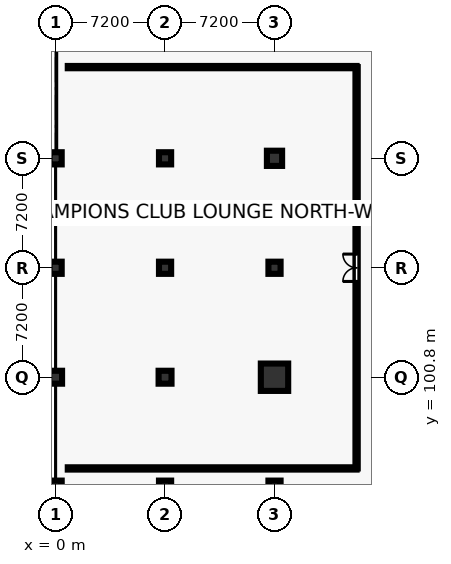
"""IFC4 building model, lengths in metres.
Left out: names, types, materials, properties, quantities, classifications, styles, units other than length and angle.
Written with IfcOpenShell. Run it as: python <this file> out.ifc"""

import sys

from ifc_helpers import new_model, si_unit, direction, frame, frame_2d, origin, origin_2d, place, context, subcontext, project, spatial, rectangle, circle, extrude, element, fill, save


model = new_model("IFC4")
c1 = context("Model", 3, precision=1e-05, world=origin(), true_north=direction((0.0, 1.0)))
c2 = subcontext(c1, "Body", "Model", "MODEL_VIEW")
j1 = project(units=[si_unit("LENGTHUNIT", "METRE"), si_unit("PLANEANGLEUNIT", "RADIAN")], contexts=[c1])
p1 = place(None, origin())
s1 = spatial("IfcSite", under=j1, at=p1, CompositionType="ELEMENT")
p2 = place(p1, origin())
s2 = spatial("IfcBuilding", under=s1, at=p2, CompositionType="ELEMENT")
p3 = place(p2, frame((0.0, 0.0, 5.4)))
s3 = spatial("IfcBuildingStorey", under=s2, at=p3, CompositionType="ELEMENT", Elevation=5.4)
p4 = place(p3, frame((0.0, 93.6, 0.0), z_axis=(0.0, 0.0, 1.0), x_axis=(1.0, 0.0, 0.0)))
e1 = element("IfcColumn", 1, at=p4, inside=s3, PredefinedType="COLUMN", context=c2, shape_type="SweptSolid", body=[
    extrude(circle(Radius=0.4, at=origin_2d()), origin(), (0.0, 0.0, 1.0), 4.2),
])
p5 = place(p3, frame((0.0, 100.8, 0.0), z_axis=(0.0, 0.0, 1.0), x_axis=(1.0, 0.0, 0.0)))
e2 = element("IfcColumn", 2, at=p5, inside=s3, PredefinedType="COLUMN", context=c2, shape_type="SweptSolid", body=[
    extrude(rectangle(XDim=0.85, YDim=0.85, at=origin_2d()), origin(), (0.0, 0.0, 1.0), 4.2),
])
p6 = place(p3, frame((0.0, 108.0, 0.0), z_axis=(0.0, 0.0, 1.0), x_axis=(1.0, 0.0, 0.0)))
e3 = element("IfcColumn", 3, at=p6, inside=s3, PredefinedType="COLUMN", context=c2, shape_type="SweptSolid", body=[
    extrude(rectangle(XDim=0.8, YDim=0.8, at=origin_2d()), origin(), (0.0, 0.0, 1.0), 4.2),
])
for number, where, z_axis, x_axis in (
    (4, (0.0, 115.2, 0.0), (0.0, 0.0, 1.0), (1.0, 0.0, 0.0)),
    (5, (7.2, 93.6, 0.0), (0.0, 0.0, 1.0), (1.0, 0.0, 0.0)),
):
    element("IfcColumn", number, at=place(p3, frame(where, z_axis=z_axis, x_axis=x_axis)), inside=s3, PredefinedType="COLUMN", context=c2, shape_type="SweptSolid", body=[
        extrude(circle(Radius=0.4, at=origin_2d()), origin(), (0.0, 0.0, 1.0), 4.2),
    ])
p7 = place(p3, frame((7.2, 100.8, 0.0), z_axis=(0.0, 0.0, 1.0), x_axis=(1.0, 0.0, 0.0)))
e6 = element("IfcColumn", 6, at=p7, inside=s3, PredefinedType="COLUMN", context=c2, shape_type="SweptSolid", body=[
    extrude(rectangle(XDim=0.85, YDim=0.85, at=origin_2d()), origin(), (0.0, 0.0, 1.0), 4.2),
])
p8 = place(p3, frame((7.2, 108.0, 0.0), z_axis=(0.0, 0.0, 1.0), x_axis=(1.0, 0.0, 0.0)))
e7 = element("IfcColumn", 7, at=p8, inside=s3, PredefinedType="COLUMN", context=c2, shape_type="SweptSolid", body=[
    extrude(rectangle(XDim=0.8, YDim=0.8, at=origin_2d()), origin(), (0.0, 0.0, 1.0), 4.2),
])
for number, where, z_axis, x_axis in (
    (8, (7.2, 115.2, 0.0), (0.0, 0.0, 1.0), (1.0, 0.0, 0.0)),
    (9, (14.4, 93.6, 0.0), (0.0, 0.0, 1.0), (1.0, 0.0, 0.0)),
):
    element("IfcColumn", number, at=place(p3, frame(where, z_axis=z_axis, x_axis=x_axis)), inside=s3, PredefinedType="COLUMN", context=c2, shape_type="SweptSolid", body=[
        extrude(circle(Radius=0.4, at=origin_2d()), origin(), (0.0, 0.0, 1.0), 4.2),
    ])
p9 = place(p3, frame((14.4, 100.8, 0.0), z_axis=(0.0, 0.0, 1.0), x_axis=(1.0, 0.0, 0.0)))
e10 = element("IfcColumn", 10, at=p9, inside=s3, PredefinedType="COLUMN", context=c2, shape_type="SweptSolid", body=[
    extrude(circle(Radius=0.9, at=origin_2d()), origin(), (0.0, 0.0, 1.0), 4.2),
])
p10 = place(p3, frame((14.4, 108.0, 0.0), z_axis=(0.0, 0.0, 1.0), x_axis=(1.0, 0.0, 0.0)))
e11 = element("IfcColumn", 11, at=p10, inside=s3, PredefinedType="COLUMN", context=c2, shape_type="SweptSolid", body=[
    extrude(rectangle(XDim=0.8, YDim=0.8, at=origin_2d()), origin(), (0.0, 0.0, 1.0), 4.2),
])
p11 = place(p3, frame((14.4, 115.2, 0.0), z_axis=(0.0, 0.0, 1.0), x_axis=(1.0, 0.0, 0.0)))
e12 = element("IfcColumn", 12, at=p11, inside=s3, PredefinedType="COLUMN", context=c2, shape_type="SweptSolid", body=[
    extrude(circle(Radius=0.5, at=origin_2d()), origin(), (0.0, 0.0, 1.0), 4.2),
])
p12 = place(p3, frame((0.8, 94.8, 0.0), z_axis=(0.0, 0.0, 1.0), x_axis=(1.0, 0.0, 0.0)))
e13 = element("IfcWall", 13, at=p12, inside=s3, PredefinedType="PARTITIONING", context=c2, shape_type="SweptSolid", body=[
    extrude(rectangle(XDim=19.0, YDim=0.15, at=frame_2d((9.5, 0.0))), origin(), (0.0, 0.0, 1.0), 2.98),
])
p13 = place(p3, frame((19.8, 94.8, 0.0), z_axis=(0.0, 0.0, 1.0), x_axis=(0.0, 1.0, 0.0)))
e14 = element("IfcWall", 14, at=p13, inside=s3, PredefinedType="PARTITIONING", context=c2, shape_type="SweptSolid", body=[
    extrude(rectangle(XDim=26.4, YDim=0.15, at=frame_2d((13.2, 0.0))), origin(), (0.0, 0.0, 1.0), 2.98),
])
p14 = place(p13, frame((12.3, 0.0, 0.0)))
e15 = element("IfcOpeningElement", 15, at=p14, cuts=e14, PredefinedType="OPENING", context=c2, shape_type="SweptSolid", body=[
    extrude(rectangle(XDim=1.8, YDim=2.3, at=frame_2d((0.9, 1.15))), frame((0.0, 0.085, 0.0), z_axis=(0.0, -1.0, 0.0), x_axis=(1.0, 0.0, 0.0)), (0.0, 0.0, 1.0), 0.17),
])
p15 = place(p3, frame((19.8, 121.2, 0.0), z_axis=(0.0, 0.0, 1.0), x_axis=(-1.0, 0.0, 0.0)))
e16 = element("IfcWall", 16, at=p15, inside=s3, PredefinedType="PARTITIONING", context=c2, shape_type="SweptSolid", body=[
    extrude(rectangle(XDim=19.0, YDim=0.15, at=frame_2d((9.5, 0.0))), origin(), (0.0, 0.0, 1.0), 2.98),
])
p16 = place(p14, origin())
e17 = element("IfcDoor", 17, at=p16, inside=s3, OperationType="DOUBLE_DOOR_SINGLE_SWING", PredefinedType="DOOR", context=c2, shape_type="SweptSolid", body=[
    extrude(rectangle(XDim=1.8, YDim=2.3, at=frame_2d((0.9, 1.15))), frame((0.0, 0.025, 0.0), z_axis=(0.0, -1.0, 0.0), x_axis=(1.0, 0.0, 0.0)), (0.0, 0.0, 1.0), 0.05),
])
fill(e15, e17)
save(model, sys.argv[1])
